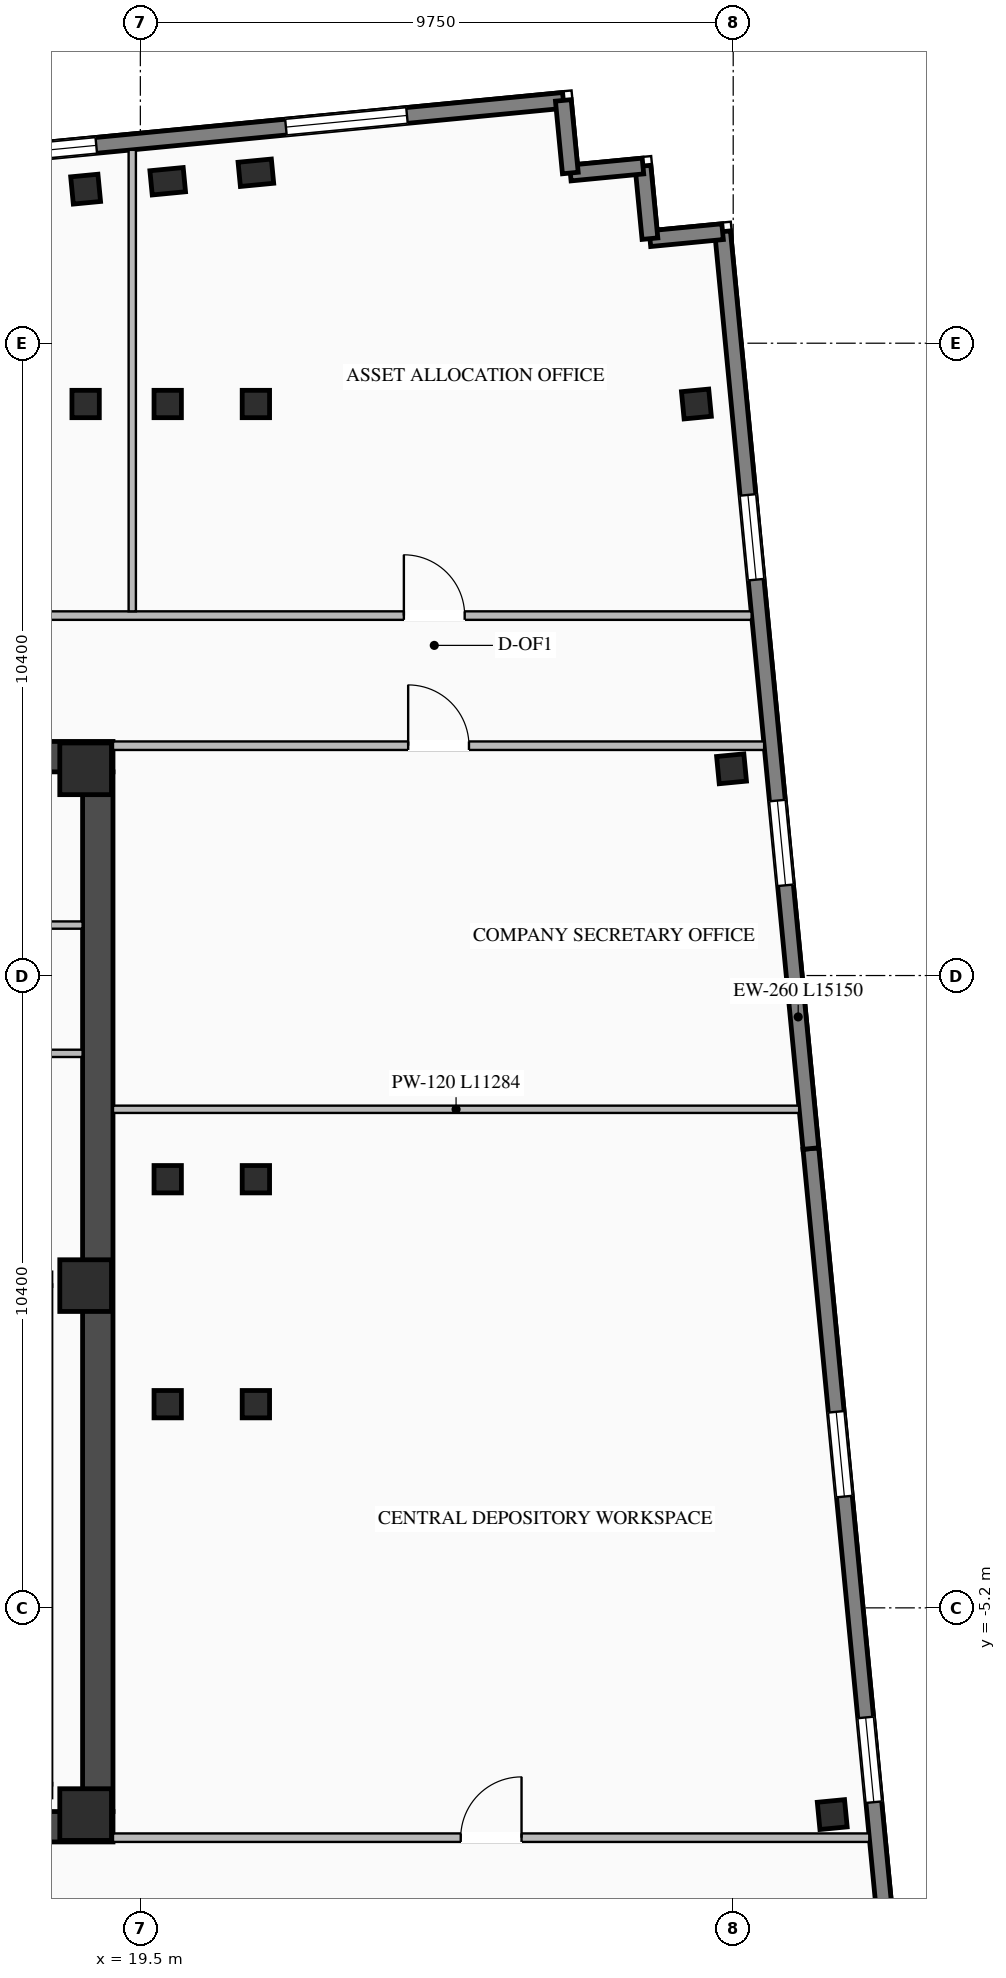
"""IFC4 building model, lengths in metres.
Left out: names, types, materials, properties, quantities, classifications, styles, units other than length and angle.
Written with IfcOpenShell. Run it as: python <this file> out.ifc"""

import sys

from ifc_helpers import new_model, si_unit, direction, frame, frame_2d, origin, origin_2d, place, context, subcontext, project, spatial, rectangle, i_section, extrude, element, fill, save


model = new_model("IFC4")
c1 = context("Model", 3, precision=1e-05, world=origin(), true_north=direction((0.0, 1.0)))
c2 = subcontext(c1, "Body", "Model", "MODEL_VIEW")
j1 = project(units=[si_unit("LENGTHUNIT", "METRE"), si_unit("PLANEANGLEUNIT", "RADIAN")], contexts=[c1])
p1 = place(None, origin())
s1 = spatial("IfcSite", under=j1, at=p1, CompositionType="ELEMENT")
p2 = place(p1, origin())
s2 = spatial("IfcBuilding", under=s1, at=p2, CompositionType="ELEMENT")
p3 = place(p2, frame((0.0, 0.0, 262.05)))
s3 = spatial("IfcBuildingStorey", under=s2, at=p3, CompositionType="ELEMENT", Elevation=262.05)
p4 = place(p3, frame((8.8, -8.8, 0.0), z_axis=(0.0, 0.0, 1.0), x_axis=(1.0, 0.0, 0.0)))
e1 = element("IfcWall", 1, at=p4, inside=s3, PredefinedType="SHEAR", context=c2, shape_type="SweptSolid", body=[
    extrude(rectangle(XDim=10.25, YDim=0.5, at=frame_2d((5.125, 0.0))), origin(), (0.0, 0.0, 1.0), 3.27),
])
p5 = place(p3, frame((8.8, 8.8, 0.0), z_axis=(0.0, 0.0, 1.0), x_axis=(1.0, 0.0, 0.0)))
e2 = element("IfcWall", 2, at=p5, inside=s3, PredefinedType="SHEAR", context=c2, shape_type="SweptSolid", body=[
    extrude(rectangle(XDim=10.25, YDim=0.5, at=frame_2d((5.125, 0.0))), origin(), (0.0, 0.0, 1.0), 3.27),
])
p6 = place(p5, frame((3.25, 0.0, 0.0)))
e3 = element("IfcOpeningElement", 3, at=p6, cuts=e2, PredefinedType="OPENING", context=c2, shape_type="SweptSolid", body=[
    extrude(rectangle(XDim=1.4, YDim=2.05, at=frame_2d((0.7, 1.025))), frame((0.0, 0.26, 0.0), z_axis=(0.0, -1.0, 0.0), x_axis=(1.0, 0.0, 0.0)), (0.0, 0.0, 1.0), 0.52),
])
p7 = place(p3, frame((18.8, -8.55, 0.0), z_axis=(0.0, 0.0, 1.0), x_axis=(0.0, 1.0, 0.0)))
e4 = element("IfcWall", 4, at=p7, inside=s3, PredefinedType="SHEAR", context=c2, shape_type="SweptSolid", body=[
    extrude(rectangle(XDim=17.1, YDim=0.5, at=frame_2d((8.55, 0.0))), origin(), (0.0, 0.0, 1.0), 3.27),
])
for number, where, z_axis, x_axis in (
    (5, (18.6, -8.6, 0.0), (0.0, 0.0, 1.0), (1.0, 0.0, 0.0)),
    (6, (18.6, 0.1, 0.0), (0.0, 0.0, 1.0), (1.0, 0.0, 0.0)),
    (7, (18.6, 8.6, 0.0), (0.0, 0.0, 1.0), (1.0, 0.0, 0.0)),
):
    element("IfcColumn", number, at=place(p3, frame(where, z_axis=z_axis, x_axis=x_axis)), inside=s3, PredefinedType="COLUMN", context=c2, shape_type="SweptSolid", body=[
        extrude(rectangle(XDim=0.85, YDim=0.85, at=origin_2d()), origin(), (0.0, 0.0, 1.0), 3.45),
    ])
for number, where, z_axis, x_axis in (
    (8, (18.6, 14.6, 0.0), (0.0, 0.0, 1.0), (1.0, 0.0, 0.0)),
    (9, (19.95, 14.6, 0.0), (0.0, 0.0, 1.0), (1.0, 0.0, 0.0)),
    (10, (21.4, 14.6, 0.0), (0.0, 0.0, 1.0), (1.0, 0.0, 0.0)),
    (11, (19.95, -1.85, 0.0), (0.0, 0.0, 1.0), (1.0, 0.0, 0.0)),
    (12, (19.95, 1.85, 0.0), (0.0, 0.0, 1.0), (1.0, 0.0, 0.0)),
    (13, (21.4, -1.85, 0.0), (0.0, 0.0, 1.0), (1.0, 0.0, 0.0)),
    (14, (21.4, 1.85, 0.0), (0.0, 0.0, 1.0), (1.0, 0.0, 0.0)),
    (15, (18.6, 18.134, 0.0), (0.0, 0.0, 1.0), (0.995, 0.096, 0.0)),
    (16, (30.879, -8.6, 0.0), (0.0, 0.0, 1.0), (0.995, 0.096, 0.0)),
    (17, (29.223, 8.6, 0.0), (0.0, 0.0, 1.0), (0.995, 0.096, 0.0)),
    (18, (28.645, 14.6, 0.0), (0.0, 0.0, 1.0), (0.995, 0.096, 0.0)),
):
    element("IfcColumn", number, at=place(p3, frame(where, z_axis=z_axis, x_axis=x_axis)), inside=s3, PredefinedType="COLUMN", context=c2, shape_type="SweptSolid", body=[
        extrude(i_section(OverallWidth=0.45, OverallDepth=0.45, WebThickness=0.022, FlangeThickness=0.032, at=origin_2d()), origin(), (0.0, 0.0, 1.0), 3.45),
    ])
for number, where, z_axis, x_axis in (
    (19, (19.95, 18.264, 0.0), (0.0, 0.0, 1.0), (0.995, 0.096, 0.0)),
    (20, (21.4, 18.403, 0.0), (0.0, 0.0, 1.0), (0.995, 0.096, 0.0)),
):
    element("IfcColumn", number, at=place(p3, frame(where, z_axis=z_axis, x_axis=x_axis)), inside=s3, PredefinedType="PILASTER", context=c2, shape_type="SweptSolid", body=[
        extrude(rectangle(XDim=0.55, YDim=0.4, at=origin_2d()), origin(), (0.0, 0.0, 1.0), 3.45),
    ])
p8 = place(p3, frame((15.756, 18.563, 0.0), z_axis=(0.0, 0.0, 1.0), x_axis=(0.995396745868, 0.095840066339, 0.0)))
e21 = element("IfcWall", 21, at=p8, inside=s3, PredefinedType="STANDARD", context=c2, shape_type="SweptSolid", body=[
    extrude(rectangle(XDim=10.75, YDim=0.26, at=frame_2d((5.375, 0.0))), origin(), (0.0, 0.0, 1.0), 3.25),
])
p9 = place(p8, frame((1.033, 0.0, 0.76)))
e22 = element("IfcOpeningElement", 22, at=p9, cuts=e21, PredefinedType="OPENING", context=c2, shape_type="SweptSolid", body=[
    extrude(rectangle(XDim=2.0, YDim=2.05, at=frame_2d((1.0, 1.025))), frame((0.0, 0.14, 0.0), z_axis=(0.0, -1.0, 0.0), x_axis=(1.0, 0.0, 0.0)), (0.0, 0.0, 1.0), 0.28),
])
p10 = place(p8, frame((6.167, 0.0, 0.76)))
e23 = element("IfcOpeningElement", 23, at=p10, cuts=e21, PredefinedType="OPENING", context=c2, shape_type="SweptSolid", body=[
    extrude(rectangle(XDim=2.0, YDim=2.05, at=frame_2d((1.0, 1.025))), frame((0.0, 0.14, 0.0), z_axis=(0.0, -1.0, 0.0), x_axis=(1.0, 0.0, 0.0)), (0.0, 0.0, 1.0), 0.28),
])
p11 = place(p3, frame((30.527, 2.354, 0.0), z_axis=(0.0, 0.0, 1.0), x_axis=(0.095850890337, -0.995395703638, 0.0)))
e24 = element("IfcWall", 24, at=p11, inside=s3, PredefinedType="STANDARD", context=c2, shape_type="SweptSolid", body=[
    extrude(rectangle(XDim=15.15, YDim=0.26, at=frame_2d((7.575, 0.0))), origin(), (0.0, 0.0, 1.0), 3.25),
])
p12 = place(p11, frame((4.35, 0.0, 0.76)))
e25 = element("IfcOpeningElement", 25, at=p12, cuts=e24, PredefinedType="OPENING", context=c2, shape_type="SweptSolid", body=[
    extrude(rectangle(XDim=1.4, YDim=1.95, at=frame_2d((0.7, 0.975))), frame((0.0, 0.14, 0.0), z_axis=(0.0, -1.0, 0.0), x_axis=(1.0, 0.0, 0.0)), (0.0, 0.0, 1.0), 0.28),
])
p13 = place(p11, frame((9.4, 0.0, 0.76)))
e26 = element("IfcOpeningElement", 26, at=p13, cuts=e24, PredefinedType="OPENING", context=c2, shape_type="SweptSolid", body=[
    extrude(rectangle(XDim=1.4, YDim=1.95, at=frame_2d((0.7, 0.975))), frame((0.0, 0.14, 0.0), z_axis=(0.0, -1.0, 0.0), x_axis=(1.0, 0.0, 0.0)), (0.0, 0.0, 1.0), 0.28),
])
p14 = place(p3, frame((29.075, 17.435, 0.0), z_axis=(0.0, 0.0, 1.0), x_axis=(0.095850890337, -0.995395703638, 0.0)))
e27 = element("IfcWall", 27, at=p14, inside=s3, PredefinedType="STANDARD", context=c2, shape_type="SweptSolid", body=[
    extrude(rectangle(XDim=15.15, YDim=0.26, at=frame_2d((7.575, 0.0))), origin(), (0.0, 0.0, 1.0), 3.25),
])
p15 = place(p14, frame((4.35, 0.0, 0.76)))
e28 = element("IfcOpeningElement", 28, at=p15, cuts=e27, PredefinedType="OPENING", context=c2, shape_type="SweptSolid", body=[
    extrude(rectangle(XDim=1.4, YDim=1.95, at=frame_2d((0.7, 0.975))), frame((0.0, 0.14, 0.0), z_axis=(0.0, -1.0, 0.0), x_axis=(1.0, 0.0, 0.0)), (0.0, 0.0, 1.0), 0.28),
])
p16 = place(p14, frame((9.4, 0.0, 0.76)))
e29 = element("IfcOpeningElement", 29, at=p16, cuts=e27, PredefinedType="OPENING", context=c2, shape_type="SweptSolid", body=[
    extrude(rectangle(XDim=1.4, YDim=1.95, at=frame_2d((0.7, 0.975))), frame((0.0, 0.14, 0.0), z_axis=(0.0, -1.0, 0.0), x_axis=(1.0, 0.0, 0.0)), (0.0, 0.0, 1.0), 0.28),
])
for number, where, z_axis, x_axis in (
    (30, (29.075, 17.435, 0.0), (0.0, 0.0, 1.0), (-0.995, -0.096, 0.0)),
    (31, (27.881, 17.32, 0.0), (0.0, 0.0, 1.0), (-0.096, 0.995, 0.0)),
):
    element("IfcWall", number, at=place(p3, frame(where, z_axis=z_axis, x_axis=x_axis)), inside=s3, PredefinedType="STANDARD", context=c2, shape_type="SweptSolid", body=[
        extrude(rectangle(XDim=1.2, YDim=0.26, at=frame_2d((0.6, 0.0))), origin(), (0.0, 0.0, 1.0), 3.25),
    ])
for number, where, z_axis, x_axis in (
    (32, (27.766, 18.514, 0.0), (0.0, 0.0, 1.0), (-0.995, -0.096, 0.0)),
    (33, (26.571, 18.399, 0.0), (0.0, 0.0, 1.0), (-0.096, 0.995, 0.0)),
):
    element("IfcWall", number, at=place(p3, frame(where, z_axis=z_axis, x_axis=x_axis)), inside=s3, PredefinedType="STANDARD", context=c2, shape_type="SweptSolid", body=[
        extrude(rectangle(XDim=1.2, YDim=0.26, at=frame_2d((0.6, 0.0))), origin(), (0.0, 0.0, 1.0), 3.25),
    ])
p17 = place(p3, frame((13.9, 3.92, 0.0), z_axis=(0.0, 0.0, 1.0), x_axis=(1.0, 0.0, 0.0)))
e34 = element("IfcWall", 34, at=p17, inside=s3, PredefinedType="STANDARD", context=c2, shape_type="SweptSolid", body=[
    extrude(rectangle(XDim=4.65, YDim=0.12, at=frame_2d((2.325, 0.0))), origin(), (0.0, 0.0, 1.0), 3.25),
])
p18 = place(p3, frame((16.15, 6.03, 0.0), z_axis=(0.0, 0.0, 1.0), x_axis=(1.0, 0.0, 0.0)))
e35 = element("IfcWall", 35, at=p18, inside=s3, PredefinedType="STANDARD", context=c2, shape_type="SweptSolid", body=[
    extrude(rectangle(XDim=2.4, YDim=0.12, at=frame_2d((1.2, 0.0))), origin(), (0.0, 0.0, 1.0), 3.25),
])
p19 = place(p3, frame((-23.733, 11.12, 0.0), z_axis=(0.0, 0.0, 1.0), x_axis=(1.0, 0.0, 0.0)))
e36 = element("IfcWall", 36, at=p19, inside=s3, PredefinedType="STANDARD", context=c2, shape_type="SweptSolid", body=[
    extrude(rectangle(XDim=53.285, YDim=0.14, at=frame_2d((26.643, 0.0))), origin(), (0.0, 0.0, 1.0), 3.25),
])
p20 = place(p19, frame((4.133, 0.0, 0.0)))
e37 = element("IfcOpeningElement", 37, at=p20, cuts=e36, PredefinedType="OPENING", context=c2, shape_type="SweptSolid", body=[
    extrude(rectangle(XDim=1.0, YDim=2.08, at=frame_2d((0.5, 1.04))), frame((0.0, 0.08, 0.0), z_axis=(0.0, -1.0, 0.0), x_axis=(1.0, 0.0, 0.0)), (0.0, 0.0, 1.0), 0.16),
])
p21 = place(p19, frame((13.84, 0.0, 0.0)))
e38 = element("IfcOpeningElement", 38, at=p21, cuts=e36, PredefinedType="OPENING", context=c2, shape_type="SweptSolid", body=[
    extrude(rectangle(XDim=1.0, YDim=2.08, at=frame_2d((0.5, 1.04))), frame((0.0, 0.08, 0.0), z_axis=(0.0, -1.0, 0.0), x_axis=(1.0, 0.0, 0.0)), (0.0, 0.0, 1.0), 0.16),
])
p22 = place(p19, frame((25.024, 0.0, 0.0)))
e39 = element("IfcOpeningElement", 39, at=p22, cuts=e36, PredefinedType="OPENING", context=c2, shape_type="SweptSolid", body=[
    extrude(rectangle(XDim=1.0, YDim=2.08, at=frame_2d((0.5, 1.04))), frame((0.0, 0.08, 0.0), z_axis=(0.0, -1.0, 0.0), x_axis=(1.0, 0.0, 0.0)), (0.0, 0.0, 1.0), 0.16),
])
p23 = place(p19, frame((36.741, 0.0, 0.0)))
e40 = element("IfcOpeningElement", 40, at=p23, cuts=e36, PredefinedType="OPENING", context=c2, shape_type="SweptSolid", body=[
    extrude(rectangle(XDim=1.0, YDim=2.08, at=frame_2d((0.5, 1.04))), frame((0.0, 0.08, 0.0), z_axis=(0.0, -1.0, 0.0), x_axis=(1.0, 0.0, 0.0)), (0.0, 0.0, 1.0), 0.16),
])
p24 = place(p19, frame((47.566, 0.0, 0.0)))
e41 = element("IfcOpeningElement", 41, at=p24, cuts=e36, PredefinedType="OPENING", context=c2, shape_type="SweptSolid", body=[
    extrude(rectangle(XDim=1.0, YDim=2.08, at=frame_2d((0.5, 1.04))), frame((0.0, 0.08, 0.0), z_axis=(0.0, -1.0, 0.0), x_axis=(1.0, 0.0, 0.0)), (0.0, 0.0, 1.0), 0.16),
])
p25 = place(p3, frame((19.367, 11.19, 0.0), z_axis=(0.0, 0.0, 1.0), x_axis=(0.0, 1.0, 0.0)))
e42 = element("IfcWall", 42, at=p25, inside=s3, PredefinedType="STANDARD", context=c2, shape_type="SweptSolid", body=[
    extrude(rectangle(XDim=7.59, YDim=0.12, at=frame_2d((3.795, 0.0))), origin(), (0.0, 0.0, 1.0), 3.25),
])
p26 = place(p3, frame((19.05, 8.98, 0.0), z_axis=(0.0, 0.0, 1.0), x_axis=(1.0, 0.0, 0.0)))
e43 = element("IfcWall", 43, at=p26, inside=s3, PredefinedType="STANDARD", context=c2, shape_type="SweptSolid", body=[
    extrude(rectangle(XDim=10.709, YDim=0.14, at=frame_2d((5.354, 0.0))), origin(), (0.0, 0.0, 1.0), 3.25),
])
p27 = place(p26, frame((4.854, 0.0, 0.0)))
e44 = element("IfcOpeningElement", 44, at=p27, cuts=e43, PredefinedType="OPENING", context=c2, shape_type="SweptSolid", body=[
    extrude(rectangle(XDim=1.0, YDim=2.08, at=frame_2d((0.5, 1.04))), frame((0.0, 0.08, 0.0), z_axis=(0.0, -1.0, 0.0), x_axis=(1.0, 0.0, 0.0)), (0.0, 0.0, 1.0), 0.16),
])
p28 = place(p3, frame((19.05, -8.98, 0.0), z_axis=(0.0, 0.0, 1.0), x_axis=(1.0, 0.0, 0.0)))
e45 = element("IfcWall", 45, at=p28, inside=s3, PredefinedType="STANDARD", context=c2, shape_type="SweptSolid", body=[
    extrude(rectangle(XDim=12.438, YDim=0.14, at=frame_2d((6.219, 0.0))), origin(), (0.0, 0.0, 1.0), 3.25),
])
p29 = place(p28, frame((5.719, 0.0, 0.0)))
e46 = element("IfcOpeningElement", 46, at=p29, cuts=e45, PredefinedType="OPENING", context=c2, shape_type="SweptSolid", body=[
    extrude(rectangle(XDim=1.0, YDim=2.08, at=frame_2d((0.5, 1.04))), frame((0.0, 0.08, 0.0), z_axis=(0.0, -1.0, 0.0), x_axis=(1.0, 0.0, 0.0)), (0.0, 0.0, 1.0), 0.16),
])
p30 = place(p3, frame((19.05, 3.0, 0.0), z_axis=(0.0, 0.0, 1.0), x_axis=(1.0, 0.0, 0.0)))
e47 = element("IfcWall", 47, at=p30, inside=s3, PredefinedType="STANDARD", context=c2, shape_type="SweptSolid", body=[
    extrude(rectangle(XDim=11.284, YDim=0.12, at=frame_2d((5.642, 0.0))), origin(), (0.0, 0.0, 1.0), 3.25),
])
p31 = place(p9, origin())
e48 = element("IfcWindow", 48, at=p31, inside=s3, PartitioningType="DOUBLE_PANEL_VERTICAL", PredefinedType="WINDOW", context=c2, shape_type="SweptSolid", body=[
    extrude(rectangle(XDim=2.0, YDim=2.05, at=frame_2d((1.0, 1.025))), frame((0.0, 0.03, 0.0), z_axis=(0.0, -1.0, 0.0), x_axis=(1.0, 0.0, 0.0)), (0.0, 0.0, 1.0), 0.06),
])
fill(e22, e48)
p32 = place(p10, origin())
e49 = element("IfcWindow", 49, at=p32, inside=s3, PartitioningType="DOUBLE_PANEL_VERTICAL", PredefinedType="WINDOW", context=c2, shape_type="SweptSolid", body=[
    extrude(rectangle(XDim=2.0, YDim=2.05, at=frame_2d((1.0, 1.025))), frame((0.0, 0.03, 0.0), z_axis=(0.0, -1.0, 0.0), x_axis=(1.0, 0.0, 0.0)), (0.0, 0.0, 1.0), 0.06),
])
fill(e23, e49)
p33 = place(p12, origin())
e50 = element("IfcWindow", 50, at=p33, inside=s3, PartitioningType="SINGLE_PANEL", PredefinedType="WINDOW", context=c2, shape_type="SweptSolid", body=[
    extrude(rectangle(XDim=1.4, YDim=1.95, at=frame_2d((0.7, 0.975))), frame((0.0, 0.03, 0.0), z_axis=(0.0, -1.0, 0.0), x_axis=(1.0, 0.0, 0.0)), (0.0, 0.0, 1.0), 0.06),
])
fill(e25, e50)
p34 = place(p13, origin())
e51 = element("IfcWindow", 51, at=p34, inside=s3, PartitioningType="SINGLE_PANEL", PredefinedType="WINDOW", context=c2, shape_type="SweptSolid", body=[
    extrude(rectangle(XDim=1.4, YDim=1.95, at=frame_2d((0.7, 0.975))), frame((0.0, 0.03, 0.0), z_axis=(0.0, -1.0, 0.0), x_axis=(1.0, 0.0, 0.0)), (0.0, 0.0, 1.0), 0.06),
])
fill(e26, e51)
p35 = place(p15, origin())
e52 = element("IfcWindow", 52, at=p35, inside=s3, PartitioningType="SINGLE_PANEL", PredefinedType="WINDOW", context=c2, shape_type="SweptSolid", body=[
    extrude(rectangle(XDim=1.4, YDim=1.95, at=frame_2d((0.7, 0.975))), frame((0.0, 0.03, 0.0), z_axis=(0.0, -1.0, 0.0), x_axis=(1.0, 0.0, 0.0)), (0.0, 0.0, 1.0), 0.06),
])
fill(e28, e52)
p36 = place(p16, origin())
e53 = element("IfcWindow", 53, at=p36, inside=s3, PartitioningType="SINGLE_PANEL", PredefinedType="WINDOW", context=c2, shape_type="SweptSolid", body=[
    extrude(rectangle(XDim=1.4, YDim=1.95, at=frame_2d((0.7, 0.975))), frame((0.0, 0.03, 0.0), z_axis=(0.0, -1.0, 0.0), x_axis=(1.0, 0.0, 0.0)), (0.0, 0.0, 1.0), 0.06),
])
fill(e29, e53)
p37 = place(p24, origin())
e54 = element("IfcDoor", 54, at=p37, inside=s3, OperationType="SINGLE_SWING_LEFT", PredefinedType="DOOR", context=c2, shape_type="SweptSolid", body=[
    extrude(rectangle(XDim=1.0, YDim=2.08, at=frame_2d((0.5, 1.04))), frame((0.0, 0.025, 0.0), z_axis=(0.0, -1.0, 0.0), x_axis=(1.0, 0.0, 0.0)), (0.0, 0.0, 1.0), 0.05),
])
fill(e41, e54)
p38 = place(p27, origin())
e55 = element("IfcDoor", 55, at=p38, inside=s3, OperationType="SINGLE_SWING_LEFT", PredefinedType="DOOR", context=c2, shape_type="SweptSolid", body=[
    extrude(rectangle(XDim=1.0, YDim=2.08, at=frame_2d((0.5, 1.04))), frame((0.0, 0.025, 0.0), z_axis=(0.0, -1.0, 0.0), x_axis=(1.0, 0.0, 0.0)), (0.0, 0.0, 1.0), 0.05),
])
fill(e44, e55)
p39 = place(p29, origin())
e56 = element("IfcDoor", 56, at=p39, inside=s3, OperationType="SINGLE_SWING_RIGHT", PredefinedType="DOOR", context=c2, shape_type="SweptSolid", body=[
    extrude(rectangle(XDim=1.0, YDim=2.08, at=frame_2d((0.5, 1.04))), frame((0.0, 0.025, 0.0), z_axis=(0.0, -1.0, 0.0), x_axis=(1.0, 0.0, 0.0)), (0.0, 0.0, 1.0), 0.05),
])
fill(e46, e56)
save(model, sys.argv[1])
